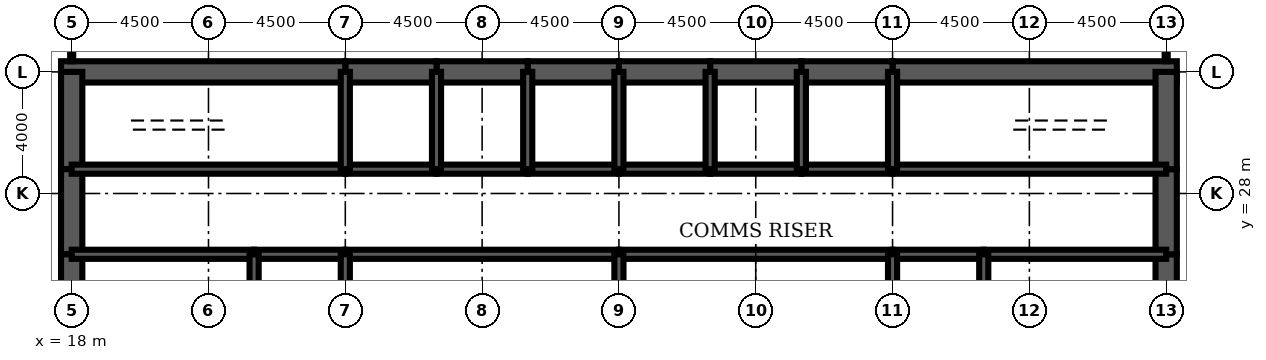
"""IFC4 building model, lengths in metres.
Left out: names, types, materials, properties, quantities, classifications, styles, units other than length and angle.
Written with IfcOpenShell. Run it as: python <this file> out.ifc"""

import sys

from ifc_helpers import new_model, si_unit, direction, frame, frame_2d, origin, place, context, subcontext, project, spatial, rectangle, extrude, element, fill, save


model = new_model("IFC4")
c1 = context("Model", 3, precision=1e-05, world=origin(), true_north=direction((0.0, 1.0)))
c2 = subcontext(c1, "Body", "Model", "MODEL_VIEW")
j1 = project(units=[si_unit("LENGTHUNIT", "METRE"), si_unit("PLANEANGLEUNIT", "RADIAN")], contexts=[c1])
p1 = place(None, origin())
s1 = spatial("IfcSite", under=j1, at=p1, CompositionType="ELEMENT")
p2 = place(p1, origin())
s2 = spatial("IfcBuilding", under=s1, at=p2, CompositionType="ELEMENT")
p3 = place(p2, frame((0.0, 0.0, 283.7)))
s3 = spatial("IfcBuildingStorey", under=s2, at=p3, CompositionType="ELEMENT", Elevation=283.7)
p4 = place(p3, frame((54.35, 32.0, 0.0), z_axis=(0.0, 0.0, 1.0), x_axis=(-1.0, 0.0, 0.0)))
e1 = element("IfcWall", 1, at=p4, inside=s3, PredefinedType="SHEAR", context=c2, shape_type="SweptSolid", body=[
    extrude(rectangle(XDim=9.35, YDim=0.7, at=frame_2d((4.675, 0.0))), origin(), (0.0, 0.0, 1.0), 4.2),
])
for number, where, z_axis, x_axis in (
    (2, (45.0, 32.0, 0.0), (0.0, 0.0, 1.0), (-1.0, 0.0, 0.0)),
    (3, (42.0, 32.0, 0.0), (0.0, 0.0, 1.0), (-1.0, 0.0, 0.0)),
    (4, (39.0, 32.0, 0.0), (0.0, 0.0, 1.0), (-1.0, 0.0, 0.0)),
    (5, (36.0, 32.0, 0.0), (0.0, 0.0, 1.0), (-1.0, 0.0, 0.0)),
    (6, (33.0, 32.0, 0.0), (0.0, 0.0, 1.0), (-1.0, 0.0, 0.0)),
    (7, (30.0, 32.0, 0.0), (0.0, 0.0, 1.0), (-1.0, 0.0, 0.0)),
):
    element("IfcWall", number, at=place(p3, frame(where, z_axis=z_axis, x_axis=x_axis)), inside=s3, PredefinedType="SHEAR", context=c2, shape_type="SweptSolid", body=[
        extrude(rectangle(XDim=3.0, YDim=0.7, at=frame_2d((1.5, 0.0))), origin(), (0.0, 0.0, 1.0), 4.2),
    ])
p5 = place(p3, frame((27.0, 32.0, 0.0), z_axis=(0.0, 0.0, 1.0), x_axis=(-1.0, 0.0, 0.0)))
e8 = element("IfcWall", 8, at=p5, inside=s3, PredefinedType="SHEAR", context=c2, shape_type="SweptSolid", body=[
    extrude(rectangle(XDim=9.35, YDim=0.7, at=frame_2d((4.675, 0.0))), origin(), (0.0, 0.0, 1.0), 4.2),
])
p6 = place(p3, frame((18.0, 32.0, 0.0), z_axis=(0.0, 0.0, 1.0), x_axis=(0.0, -1.0, 0.0)))
e9 = element("IfcWall", 9, at=p6, inside=s3, PredefinedType="SHEAR", context=c2, shape_type="SweptSolid", body=[
    extrude(rectangle(XDim=3.2, YDim=0.7, at=frame_2d((1.6, 0.0))), origin(), (0.0, 0.0, 1.0), 4.2),
])
p7 = place(p3, frame((18.0, 28.8, 0.0), z_axis=(0.0, 0.0, 1.0), x_axis=(0.0, -1.0, 0.0)))
e10 = element("IfcWall", 10, at=p7, inside=s3, PredefinedType="SHEAR", context=c2, shape_type="SweptSolid", body=[
    extrude(rectangle(XDim=2.8, YDim=0.7, at=frame_2d((1.4, 0.0))), origin(), (0.0, 0.0, 1.0), 4.2),
])
p8 = place(p7, frame((0.4, 0.0, 0.0)))
e11 = element("IfcOpeningElement", 11, at=p8, cuts=e10, PredefinedType="OPENING", context=c2, shape_type="SweptSolid", body=[
    extrude(rectangle(XDim=1.8, YDim=2.1, at=frame_2d((0.9, 1.05))), frame((0.0, 0.36, 0.0), z_axis=(0.0, -1.0, 0.0), x_axis=(1.0, 0.0, 0.0)), (0.0, 0.0, 1.0), 0.72),
])
for number, where, z_axis, x_axis in (
    (12, (18.0, 26.0, 0.0), (0.0, 0.0, 1.0), (0.0, -1.0, 0.0)),
    (13, (54.0, 22.0, 0.0), (0.0, 0.0, 1.0), (0.0, 1.0, 0.0)),
):
    element("IfcWall", number, at=place(p3, frame(where, z_axis=z_axis, x_axis=x_axis)), inside=s3, PredefinedType="SHEAR", context=c2, shape_type="SweptSolid", body=[
        extrude(rectangle(XDim=4.0, YDim=0.7, at=frame_2d((2.0, 0.0))), origin(), (0.0, 0.0, 1.0), 4.2),
    ])
p9 = place(p3, frame((54.0, 26.0, 0.0), z_axis=(0.0, 0.0, 1.0), x_axis=(0.0, 1.0, 0.0)))
e14 = element("IfcWall", 14, at=p9, inside=s3, PredefinedType="SHEAR", context=c2, shape_type="SweptSolid", body=[
    extrude(rectangle(XDim=2.8, YDim=0.7, at=frame_2d((1.4, 0.0))), origin(), (0.0, 0.0, 1.0), 4.2),
])
p10 = place(p9, frame((0.6, 0.0, 0.0)))
e15 = element("IfcOpeningElement", 15, at=p10, cuts=e14, PredefinedType="OPENING", context=c2, shape_type="SweptSolid", body=[
    extrude(rectangle(XDim=1.8, YDim=2.1, at=frame_2d((0.9, 1.05))), frame((0.0, 0.36, 0.0), z_axis=(0.0, -1.0, 0.0), x_axis=(1.0, 0.0, 0.0)), (0.0, 0.0, 1.0), 0.72),
])
p11 = place(p3, frame((54.0, 28.8, 0.0), z_axis=(0.0, 0.0, 1.0), x_axis=(0.0, 1.0, 0.0)))
e16 = element("IfcWall", 16, at=p11, inside=s3, PredefinedType="SHEAR", context=c2, shape_type="SweptSolid", body=[
    extrude(rectangle(XDim=3.2, YDim=0.7, at=frame_2d((1.6, 0.0))), origin(), (0.0, 0.0, 1.0), 4.2),
])
p12 = place(p3, frame((18.0, 28.8, 0.0), z_axis=(0.0, 0.0, 1.0), x_axis=(1.0, 0.0, 0.0)))
e17 = element("IfcWall", 17, at=p12, inside=s3, PredefinedType="SOLIDWALL", context=c2, shape_type="SweptSolid", body=[
    extrude(rectangle(XDim=9.0, YDim=0.3, at=frame_2d((4.5, 0.0))), origin(), (0.0, 0.0, 1.0), 4.2),
])
p13 = place(p12, frame((0.65, 0.0, 0.0)))
e18 = element("IfcOpeningElement", 18, at=p13, cuts=e17, PredefinedType="OPENING", context=c2, shape_type="SweptSolid", body=[
    extrude(rectangle(XDim=1.0, YDim=2.1, at=frame_2d((0.5, 1.05))), frame((0.0, 0.16, 0.0), z_axis=(0.0, -1.0, 0.0), x_axis=(1.0, 0.0, 0.0)), (0.0, 0.0, 1.0), 0.32),
])
p14 = place(p3, frame((27.0, 28.8, 0.0), z_axis=(0.0, 0.0, 1.0), x_axis=(1.0, 0.0, 0.0)))
e19 = element("IfcWall", 19, at=p14, inside=s3, PredefinedType="SOLIDWALL", context=c2, shape_type="SweptSolid", body=[
    extrude(rectangle(XDim=3.0, YDim=0.3, at=frame_2d((1.5, 0.0))), origin(), (0.0, 0.0, 1.0), 4.2),
])
p15 = place(p14, frame((0.95, 0.0, 0.0)))
e20 = element("IfcOpeningElement", 20, at=p15, cuts=e19, PredefinedType="OPENING", context=c2, shape_type="SweptSolid", body=[
    extrude(rectangle(XDim=1.1, YDim=2.2, at=frame_2d((0.55, 1.1))), frame((0.0, 0.16, 0.0), z_axis=(0.0, -1.0, 0.0), x_axis=(1.0, 0.0, 0.0)), (0.0, 0.0, 1.0), 0.32),
])
p16 = place(p3, frame((30.0, 28.8, 0.0), z_axis=(0.0, 0.0, 1.0), x_axis=(1.0, 0.0, 0.0)))
e21 = element("IfcWall", 21, at=p16, inside=s3, PredefinedType="SOLIDWALL", context=c2, shape_type="SweptSolid", body=[
    extrude(rectangle(XDim=3.0, YDim=0.3, at=frame_2d((1.5, 0.0))), origin(), (0.0, 0.0, 1.0), 4.2),
])
p17 = place(p16, frame((0.95, 0.0, 0.0)))
e22 = element("IfcOpeningElement", 22, at=p17, cuts=e21, PredefinedType="OPENING", context=c2, shape_type="SweptSolid", body=[
    extrude(rectangle(XDim=1.1, YDim=2.2, at=frame_2d((0.55, 1.1))), frame((0.0, 0.16, 0.0), z_axis=(0.0, -1.0, 0.0), x_axis=(1.0, 0.0, 0.0)), (0.0, 0.0, 1.0), 0.32),
])
p18 = place(p3, frame((33.0, 28.8, 0.0), z_axis=(0.0, 0.0, 1.0), x_axis=(1.0, 0.0, 0.0)))
e23 = element("IfcWall", 23, at=p18, inside=s3, PredefinedType="SOLIDWALL", context=c2, shape_type="SweptSolid", body=[
    extrude(rectangle(XDim=3.0, YDim=0.3, at=frame_2d((1.5, 0.0))), origin(), (0.0, 0.0, 1.0), 4.2),
])
p19 = place(p18, frame((0.95, 0.0, 0.0)))
e24 = element("IfcOpeningElement", 24, at=p19, cuts=e23, PredefinedType="OPENING", context=c2, shape_type="SweptSolid", body=[
    extrude(rectangle(XDim=1.1, YDim=2.2, at=frame_2d((0.55, 1.1))), frame((0.0, 0.16, 0.0), z_axis=(0.0, -1.0, 0.0), x_axis=(1.0, 0.0, 0.0)), (0.0, 0.0, 1.0), 0.32),
])
p20 = place(p3, frame((36.0, 28.8, 0.0), z_axis=(0.0, 0.0, 1.0), x_axis=(1.0, 0.0, 0.0)))
e25 = element("IfcWall", 25, at=p20, inside=s3, PredefinedType="SOLIDWALL", context=c2, shape_type="SweptSolid", body=[
    extrude(rectangle(XDim=3.0, YDim=0.3, at=frame_2d((1.5, 0.0))), origin(), (0.0, 0.0, 1.0), 4.2),
])
p21 = place(p20, frame((1.0, 0.0, 0.0)))
e26 = element("IfcOpeningElement", 26, at=p21, cuts=e25, PredefinedType="OPENING", context=c2, shape_type="SweptSolid", body=[
    extrude(rectangle(XDim=1.0, YDim=2.1, at=frame_2d((0.5, 1.05))), frame((0.0, 0.16, 0.0), z_axis=(0.0, -1.0, 0.0), x_axis=(1.0, 0.0, 0.0)), (0.0, 0.0, 1.0), 0.32),
])
p22 = place(p3, frame((39.0, 28.8, 0.0), z_axis=(0.0, 0.0, 1.0), x_axis=(1.0, 0.0, 0.0)))
e27 = element("IfcWall", 27, at=p22, inside=s3, PredefinedType="SOLIDWALL", context=c2, shape_type="SweptSolid", body=[
    extrude(rectangle(XDim=3.0, YDim=0.3, at=frame_2d((1.5, 0.0))), origin(), (0.0, 0.0, 1.0), 4.2),
])
p23 = place(p22, frame((1.0, 0.0, 0.0)))
e28 = element("IfcOpeningElement", 28, at=p23, cuts=e27, PredefinedType="OPENING", context=c2, shape_type="SweptSolid", body=[
    extrude(rectangle(XDim=1.0, YDim=2.1, at=frame_2d((0.5, 1.05))), frame((0.0, 0.16, 0.0), z_axis=(0.0, -1.0, 0.0), x_axis=(1.0, 0.0, 0.0)), (0.0, 0.0, 1.0), 0.32),
])
p24 = place(p3, frame((42.0, 28.8, 0.0), z_axis=(0.0, 0.0, 1.0), x_axis=(1.0, 0.0, 0.0)))
e29 = element("IfcWall", 29, at=p24, inside=s3, PredefinedType="SOLIDWALL", context=c2, shape_type="SweptSolid", body=[
    extrude(rectangle(XDim=3.0, YDim=0.3, at=frame_2d((1.5, 0.0))), origin(), (0.0, 0.0, 1.0), 4.2),
])
p25 = place(p24, frame((0.95, 0.0, 0.0)))
e30 = element("IfcOpeningElement", 30, at=p25, cuts=e29, PredefinedType="OPENING", context=c2, shape_type="SweptSolid", body=[
    extrude(rectangle(XDim=1.1, YDim=2.2, at=frame_2d((0.55, 1.1))), frame((0.0, 0.16, 0.0), z_axis=(0.0, -1.0, 0.0), x_axis=(1.0, 0.0, 0.0)), (0.0, 0.0, 1.0), 0.32),
])
p26 = place(p3, frame((45.0, 28.8, 0.0), z_axis=(0.0, 0.0, 1.0), x_axis=(1.0, 0.0, 0.0)))
e31 = element("IfcWall", 31, at=p26, inside=s3, PredefinedType="SOLIDWALL", context=c2, shape_type="SweptSolid", body=[
    extrude(rectangle(XDim=9.0, YDim=0.3, at=frame_2d((4.5, 0.0))), origin(), (0.0, 0.0, 1.0), 4.2),
])
p27 = place(p26, frame((7.35, 0.0, 0.0)))
e32 = element("IfcOpeningElement", 32, at=p27, cuts=e31, PredefinedType="OPENING", context=c2, shape_type="SweptSolid", body=[
    extrude(rectangle(XDim=1.0, YDim=2.1, at=frame_2d((0.5, 1.05))), frame((0.0, 0.16, 0.0), z_axis=(0.0, -1.0, 0.0), x_axis=(1.0, 0.0, 0.0)), (0.0, 0.0, 1.0), 0.32),
])
p28 = place(p3, frame((18.0, 26.0, 0.0), z_axis=(0.0, 0.0, 1.0), x_axis=(1.0, 0.0, 0.0)))
e33 = element("IfcWall", 33, at=p28, inside=s3, PredefinedType="SOLIDWALL", context=c2, shape_type="SweptSolid", body=[
    extrude(rectangle(XDim=6.0, YDim=0.3, at=frame_2d((3.0, 0.0))), origin(), (0.0, 0.0, 1.0), 4.2),
])
p29 = place(p3, frame((24.0, 26.0, 0.0), z_axis=(0.0, 0.0, 1.0), x_axis=(1.0, 0.0, 0.0)))
e34 = element("IfcWall", 34, at=p29, inside=s3, PredefinedType="SOLIDWALL", context=c2, shape_type="SweptSolid", body=[
    extrude(rectangle(XDim=3.0, YDim=0.3, at=frame_2d((1.5, 0.0))), origin(), (0.0, 0.0, 1.0), 4.2),
])
for number, where, z_axis, x_axis in (
    (35, (27.0, 26.0, 0.0), (0.0, 0.0, 1.0), (1.0, 0.0, 0.0)),
    (36, (36.0, 26.0, 0.0), (0.0, 0.0, 1.0), (1.0, 0.0, 0.0)),
):
    element("IfcWall", number, at=place(p3, frame(where, z_axis=z_axis, x_axis=x_axis)), inside=s3, PredefinedType="SOLIDWALL", context=c2, shape_type="SweptSolid", body=[
        extrude(rectangle(XDim=9.0, YDim=0.3, at=frame_2d((4.5, 0.0))), origin(), (0.0, 0.0, 1.0), 4.2),
    ])
p30 = place(p3, frame((45.0, 26.0, 0.0), z_axis=(0.0, 0.0, 1.0), x_axis=(1.0, 0.0, 0.0)))
e37 = element("IfcWall", 37, at=p30, inside=s3, PredefinedType="SOLIDWALL", context=c2, shape_type="SweptSolid", body=[
    extrude(rectangle(XDim=3.0, YDim=0.3, at=frame_2d((1.5, 0.0))), origin(), (0.0, 0.0, 1.0), 4.2),
])
p31 = place(p3, frame((48.0, 26.0, 0.0), z_axis=(0.0, 0.0, 1.0), x_axis=(1.0, 0.0, 0.0)))
e38 = element("IfcWall", 38, at=p31, inside=s3, PredefinedType="SOLIDWALL", context=c2, shape_type="SweptSolid", body=[
    extrude(rectangle(XDim=6.0, YDim=0.3, at=frame_2d((3.0, 0.0))), origin(), (0.0, 0.0, 1.0), 4.2),
])
for number, where, z_axis, x_axis in (
    (39, (27.0, 28.8, 0.0), (0.0, 0.0, 1.0), (0.0, 1.0, 0.0)),
    (40, (30.0, 28.8, 0.0), (0.0, 0.0, 1.0), (0.0, 1.0, 0.0)),
    (41, (33.0, 28.8, 0.0), (0.0, 0.0, 1.0), (0.0, 1.0, 0.0)),
    (42, (36.0, 28.8, 0.0), (0.0, 0.0, 1.0), (0.0, 1.0, 0.0)),
    (43, (39.0, 28.8, 0.0), (0.0, 0.0, 1.0), (0.0, 1.0, 0.0)),
    (44, (42.0, 28.8, 0.0), (0.0, 0.0, 1.0), (0.0, 1.0, 0.0)),
    (45, (45.0, 28.8, 0.0), (0.0, 0.0, 1.0), (0.0, 1.0, 0.0)),
):
    element("IfcWall", number, at=place(p3, frame(where, z_axis=z_axis, x_axis=x_axis)), inside=s3, PredefinedType="SOLIDWALL", context=c2, shape_type="SweptSolid", body=[
        extrude(rectangle(XDim=3.2, YDim=0.3, at=frame_2d((1.6, 0.0))), origin(), (0.0, 0.0, 1.0), 4.2),
    ])
for number, where, z_axis, x_axis in (
    (46, (24.0, 22.0, 0.0), (0.0, 0.0, 1.0), (0.0, 1.0, 0.0)),
    (47, (27.0, 22.0, 0.0), (0.0, 0.0, 1.0), (0.0, 1.0, 0.0)),
    (48, (36.0, 22.0, 0.0), (0.0, 0.0, 1.0), (0.0, 1.0, 0.0)),
    (49, (45.0, 22.0, 0.0), (0.0, 0.0, 1.0), (0.0, 1.0, 0.0)),
    (50, (48.0, 22.0, 0.0), (0.0, 0.0, 1.0), (0.0, 1.0, 0.0)),
):
    element("IfcWall", number, at=place(p3, frame(where, z_axis=z_axis, x_axis=x_axis)), inside=s3, PredefinedType="SOLIDWALL", context=c2, shape_type="SweptSolid", body=[
        extrude(rectangle(XDim=4.0, YDim=0.3, at=frame_2d((2.0, 0.0))), origin(), (0.0, 0.0, 1.0), 4.2),
    ])
p32 = place(p3, frame((38.0, 22.15, 0.0), z_axis=(0.0, 0.0, 1.0), x_axis=(0.0, 1.0, 0.0)))
e51 = element("IfcWall", 51, at=p32, inside=s3, PredefinedType="PARTITIONING", context=c2, shape_type="SweptSolid", body=[
    extrude(rectangle(XDim=3.7, YDim=0.15, at=frame_2d((1.85, 0.0))), origin(), (0.0, 0.0, 1.0), 3.0),
])
p33 = place(p32, frame((2.2, 0.0, 0.0)))
e52 = element("IfcOpeningElement", 52, at=p33, cuts=e51, PredefinedType="OPENING", context=c2, shape_type="SweptSolid", body=[
    extrude(rectangle(XDim=1.0, YDim=2.1, at=frame_2d((0.5, 1.05))), frame((0.0, 0.085, 0.0), z_axis=(0.0, -1.0, 0.0), x_axis=(1.0, 0.0, 0.0)), (0.0, 0.0, 1.0), 0.17),
])
for number, where, z_axis, x_axis in (
    (53, (19.925, 22.15, 0.0), (0.0, 0.0, 1.0), (0.0, 1.0, 0.0)),
    (54, (52.075, 22.15, 0.0), (0.0, 0.0, 1.0), (0.0, 1.0, 0.0)),
):
    element("IfcWall", number, at=place(p3, frame(where, z_axis=z_axis, x_axis=x_axis)), inside=s3, PredefinedType="PARTITIONING", context=c2, shape_type="SweptSolid", body=[
        extrude(rectangle(XDim=3.7, YDim=0.15, at=frame_2d((1.85, 0.0))), origin(), (0.0, 0.0, 1.0), 3.0),
    ])
p34 = place(p3, frame((18.0, 32.35, 0.0), z_axis=(0.0, 0.0, 1.0), x_axis=(0.0, 1.0, 0.0)))
e55 = element("IfcWall", 55, at=p34, inside=s3, PredefinedType="PARTITIONING", context=c2, shape_type="SweptSolid", body=[
    extrude(rectangle(XDim=5.7, YDim=0.1, at=frame_2d((2.85, 0.0))), origin(), (0.0, 0.0, 1.0), 3.0),
])
p35 = place(p34, frame((2.05, 0.0, 0.0)))
e56 = element("IfcOpeningElement", 56, at=p35, cuts=e55, PredefinedType="OPENING", context=c2, shape_type="SweptSolid", body=[
    extrude(rectangle(XDim=1.6, YDim=2.1, at=frame_2d((0.8, 1.05))), frame((0.0, 0.06, 0.0), z_axis=(0.0, -1.0, 0.0), x_axis=(1.0, 0.0, 0.0)), (0.0, 0.0, 1.0), 0.12),
])
p36 = place(p3, frame((54.0, 32.35, 0.0), z_axis=(0.0, 0.0, 1.0), x_axis=(0.0, 1.0, 0.0)))
e57 = element("IfcWall", 57, at=p36, inside=s3, PredefinedType="PARTITIONING", context=c2, shape_type="SweptSolid", body=[
    extrude(rectangle(XDim=5.7, YDim=0.1, at=frame_2d((2.85, 0.0))), origin(), (0.0, 0.0, 1.0), 3.0),
])
p37 = place(p36, frame((2.05, 0.0, 0.0)))
e58 = element("IfcOpeningElement", 58, at=p37, cuts=e57, PredefinedType="OPENING", context=c2, shape_type="SweptSolid", body=[
    extrude(rectangle(XDim=1.6, YDim=2.1, at=frame_2d((0.8, 1.05))), frame((0.0, 0.06, 0.0), z_axis=(0.0, -1.0, 0.0), x_axis=(1.0, 0.0, 0.0)), (0.0, 0.0, 1.0), 0.12),
])
p38 = place(p33, origin())
e59 = element("IfcDoor", 59, at=p38, inside=s3, OperationType="SINGLE_SWING_RIGHT", PredefinedType="DOOR", context=c2, shape_type="SweptSolid", body=[
    extrude(rectangle(XDim=1.0, YDim=2.1, at=frame_2d((0.5, 1.05))), frame((0.0, 0.025, 0.0), z_axis=(0.0, -1.0, 0.0), x_axis=(1.0, 0.0, 0.0)), (0.0, 0.0, 1.0), 0.05),
])
fill(e52, e59)
p39 = place(p25, origin())
e60 = element("IfcDoor", 60, at=p39, inside=s3, OperationType="DOUBLE_DOOR_SLIDING", PredefinedType="USERDEFINED", context=c2, shape_type="SweptSolid", body=[
    extrude(rectangle(XDim=1.1, YDim=2.2, at=frame_2d((0.55, 1.1))), frame((0.0, 0.025, 0.0), z_axis=(0.0, -1.0, 0.0), x_axis=(1.0, 0.0, 0.0)), (0.0, 0.0, 1.0), 0.05),
])
fill(e30, e60)
p40 = place(p15, origin())
e61 = element("IfcDoor", 61, at=p40, inside=s3, OperationType="DOUBLE_DOOR_SLIDING", PredefinedType="USERDEFINED", context=c2, shape_type="SweptSolid", body=[
    extrude(rectangle(XDim=1.1, YDim=2.2, at=frame_2d((0.55, 1.1))), frame((0.0, 0.025, 0.0), z_axis=(0.0, -1.0, 0.0), x_axis=(1.0, 0.0, 0.0)), (0.0, 0.0, 1.0), 0.05),
])
fill(e20, e61)
p41 = place(p17, origin())
e62 = element("IfcDoor", 62, at=p41, inside=s3, OperationType="DOUBLE_DOOR_SLIDING", PredefinedType="USERDEFINED", context=c2, shape_type="SweptSolid", body=[
    extrude(rectangle(XDim=1.1, YDim=2.2, at=frame_2d((0.55, 1.1))), frame((0.0, 0.025, 0.0), z_axis=(0.0, -1.0, 0.0), x_axis=(1.0, 0.0, 0.0)), (0.0, 0.0, 1.0), 0.05),
])
fill(e22, e62)
p42 = place(p19, origin())
e63 = element("IfcDoor", 63, at=p42, inside=s3, OperationType="DOUBLE_DOOR_SLIDING", PredefinedType="USERDEFINED", context=c2, shape_type="SweptSolid", body=[
    extrude(rectangle(XDim=1.1, YDim=2.2, at=frame_2d((0.55, 1.1))), frame((0.0, 0.025, 0.0), z_axis=(0.0, -1.0, 0.0), x_axis=(1.0, 0.0, 0.0)), (0.0, 0.0, 1.0), 0.05),
])
fill(e24, e63)
p43 = place(p13, origin())
e64 = element("IfcDoor", 64, at=p43, inside=s3, OperationType="SINGLE_SWING_LEFT", PredefinedType="DOOR", context=c2, shape_type="SweptSolid", body=[
    extrude(rectangle(XDim=1.0, YDim=2.1, at=frame_2d((0.5, 1.05))), frame((0.0, 0.025, 0.0), z_axis=(0.0, -1.0, 0.0), x_axis=(1.0, 0.0, 0.0)), (0.0, 0.0, 1.0), 0.05),
])
fill(e18, e64)
p44 = place(p27, origin())
e65 = element("IfcDoor", 65, at=p44, inside=s3, OperationType="SINGLE_SWING_RIGHT", PredefinedType="DOOR", context=c2, shape_type="SweptSolid", body=[
    extrude(rectangle(XDim=1.0, YDim=2.1, at=frame_2d((0.5, 1.05))), frame((0.0, 0.025, 0.0), z_axis=(0.0, -1.0, 0.0), x_axis=(1.0, 0.0, 0.0)), (0.0, 0.0, 1.0), 0.05),
])
fill(e32, e65)
p45 = place(p8, origin())
e66 = element("IfcDoor", 66, at=p45, inside=s3, OperationType="SINGLE_SWING_LEFT", PredefinedType="DOOR", context=c2, shape_type="SweptSolid", body=[
    extrude(rectangle(XDim=1.8, YDim=2.1, at=frame_2d((0.9, 1.05))), frame((0.0, 0.35, 0.0), z_axis=(0.0, -1.0, 0.0), x_axis=(1.0, 0.0, 0.0)), (0.0, 0.0, 1.0), 0.699),
])
fill(e11, e66)
p46 = place(p10, origin())
e67 = element("IfcDoor", 67, at=p46, inside=s3, OperationType="SINGLE_SWING_LEFT", PredefinedType="DOOR", context=c2, shape_type="SweptSolid", body=[
    extrude(rectangle(XDim=1.8, YDim=2.1, at=frame_2d((0.9, 1.05))), frame((0.0, 0.35, 0.0), z_axis=(0.0, -1.0, 0.0), x_axis=(1.0, 0.0, 0.0)), (0.0, 0.0, 1.0), 0.699),
])
fill(e15, e67)
p47 = place(p21, origin())
e68 = element("IfcDoor", 68, at=p47, inside=s3, OperationType="SINGLE_SWING_LEFT", PredefinedType="DOOR", context=c2, shape_type="SweptSolid", body=[
    extrude(rectangle(XDim=1.0, YDim=2.1, at=frame_2d((0.5, 1.05))), frame((0.0, 0.025, 0.0), z_axis=(0.0, -1.0, 0.0), x_axis=(1.0, 0.0, 0.0)), (0.0, 0.0, 1.0), 0.05),
])
fill(e26, e68)
p48 = place(p23, origin())
e69 = element("IfcDoor", 69, at=p48, inside=s3, OperationType="SINGLE_SWING_LEFT", PredefinedType="DOOR", context=c2, shape_type="SweptSolid", body=[
    extrude(rectangle(XDim=1.0, YDim=2.1, at=frame_2d((0.5, 1.05))), frame((0.0, 0.025, 0.0), z_axis=(0.0, -1.0, 0.0), x_axis=(1.0, 0.0, 0.0)), (0.0, 0.0, 1.0), 0.05),
])
fill(e28, e69)
save(model, sys.argv[1])
